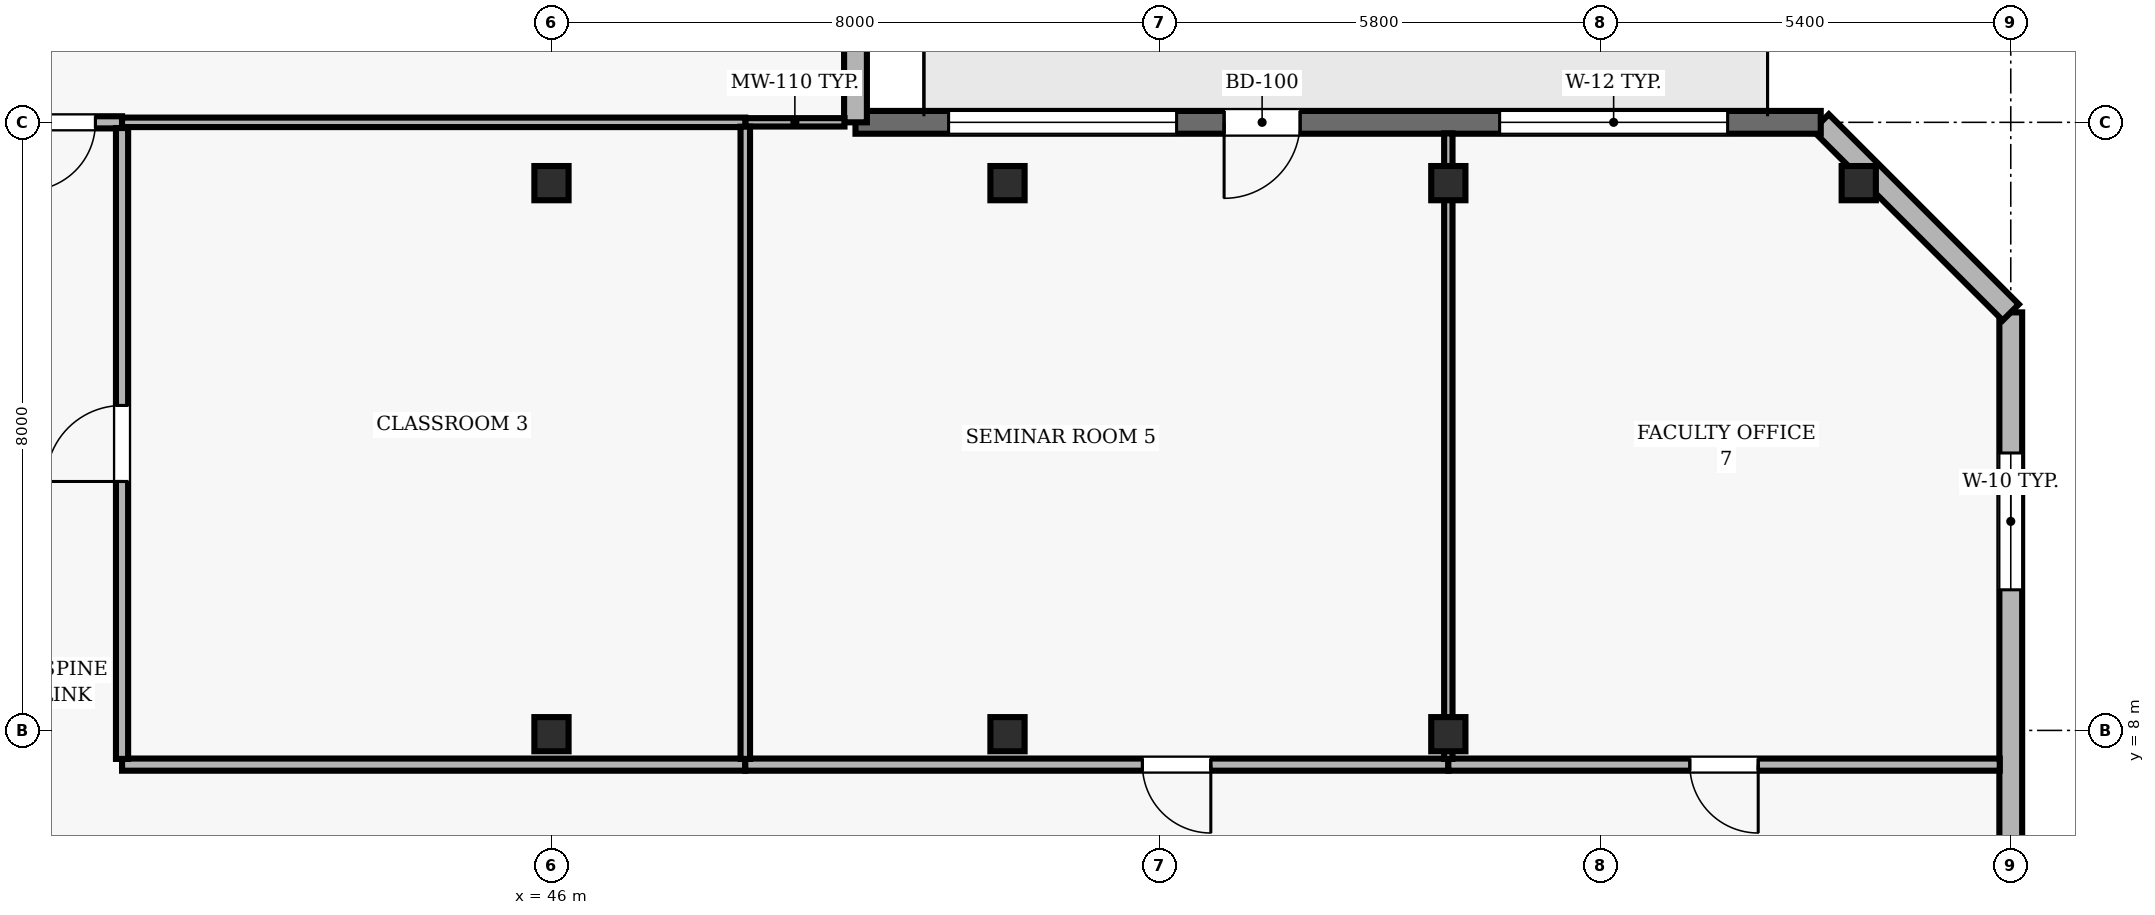
"""IFC4 building model, lengths in metres.
Left out: names, types, materials, properties, quantities, classifications, styles, units other than length and angle.
Written with IfcOpenShell. Run it as: python <this file> out.ifc"""

import sys

from ifc_helpers import new_model, si_unit, direction, frame, frame_2d, origin, origin_2d, place, context, subcontext, project, spatial, rectangle, hollow_rectangle, extrude, element, fill, save


model = new_model("IFC4")
c1 = context("Model", 3, precision=1e-05, world=origin(), true_north=direction((0.0, 1.0)))
c2 = subcontext(c1, "Body", "Model", "MODEL_VIEW")
j1 = project(units=[si_unit("LENGTHUNIT", "METRE"), si_unit("PLANEANGLEUNIT", "RADIAN")], contexts=[c1])
p1 = place(None, origin())
s1 = spatial("IfcSite", under=j1, at=p1, CompositionType="ELEMENT")
p2 = place(p1, origin())
s2 = spatial("IfcBuilding", under=s1, at=p2, CompositionType="ELEMENT")
p3 = place(p2, frame((0.0, 0.0, 179.7)))
s3 = spatial("IfcBuildingStorey", under=s2, at=p3, CompositionType="ELEMENT", Elevation=179.7)
for number, where, z_axis, x_axis in (
    (1, (46.0, 7.95, 0.0), (0.0, 0.0, 1.0), (1.0, 0.0, 0.0)),
    (2, (46.0, 15.2, 0.0), (0.0, 0.0, 1.0), (1.0, 0.0, 0.0)),
    (3, (52.0, 7.95, 0.0), (0.0, 0.0, 1.0), (1.0, 0.0, 0.0)),
    (4, (52.0, 15.2, 0.0), (0.0, 0.0, 1.0), (1.0, 0.0, 0.0)),
    (5, (57.8, 7.95, 0.0), (0.0, 0.0, 1.0), (1.0, 0.0, 0.0)),
    (6, (57.8, 15.2, 0.0), (0.0, 0.0, 1.0), (1.0, 0.0, 0.0)),
    (7, (63.2, 15.2, 0.0), (0.0, 0.0, 1.0), (1.0, 0.0, 0.0)),
):
    element("IfcColumn", number, at=place(p3, frame(where, z_axis=z_axis, x_axis=x_axis)), inside=s3, PredefinedType="COLUMN", context=c2, shape_type="SweptSolid", body=[
        extrude(hollow_rectangle(XDim=0.45, YDim=0.45, WallThickness=0.02, at=origin_2d()), origin(), (0.0, 0.0, 1.0), 3.9),
    ])
p4 = place(p3, frame((65.2, 2.5, 0.0), z_axis=(0.0, 0.0, 1.0), x_axis=(0.0, 1.0, 0.0)))
e8 = element("IfcWall", 8, at=p4, inside=s3, PredefinedType="SOLIDWALL", context=c2, shape_type="SweptSolid", body=[
    extrude(rectangle(XDim=11.0, YDim=0.3, at=frame_2d((5.5, 0.0))), origin(), (0.0, 0.0, 1.0), 3.69),
])
p5 = place(p4, frame((7.35, 0.0, 0.9)))
e9 = element("IfcOpeningElement", 9, at=p5, cuts=e8, PredefinedType="OPENING", context=c2, shape_type="SweptSolid", body=[
    extrude(rectangle(XDim=1.8, YDim=2.2, at=frame_2d((0.9, 1.1))), frame((0.0, 0.16, 0.0), z_axis=(0.0, -1.0, 0.0), x_axis=(1.0, 0.0, 0.0)), (0.0, 0.0, 1.0), 0.32),
])
p6 = place(p3, frame((65.2, 13.5, 0.0), z_axis=(0.0, 0.0, 1.0), x_axis=(-0.707106781187, 0.707106781187, 0.0)))
e10 = element("IfcWall", 10, at=p6, inside=s3, PredefinedType="SOLIDWALL", context=c2, shape_type="SweptSolid", body=[
    extrude(rectangle(XDim=3.536, YDim=0.3, at=frame_2d((1.768, 0.0))), origin(), (0.0, 0.0, 1.0), 3.69),
])
p7 = place(p3, frame((62.7, 16.0, 0.0), z_axis=(0.0, 0.0, 1.0), x_axis=(-1.0, 0.0, 0.0)))
e11 = element("IfcWall", 11, at=p7, inside=s3, PredefinedType="SOLIDWALL", context=c2, shape_type="SweptSolid", body=[
    extrude(rectangle(XDim=12.7, YDim=0.3, at=frame_2d((6.35, 0.0))), origin(), (0.0, 0.0, 1.0), 3.69),
])
p8 = place(p7, frame((6.85, 0.0, 0.0)))
e12 = element("IfcOpeningElement", 12, at=p8, cuts=e11, PredefinedType="OPENING", context=c2, shape_type="SweptSolid", body=[
    extrude(rectangle(XDim=1.0, YDim=2.2, at=frame_2d((0.5, 1.1))), frame((0.0, 0.16, 0.0), z_axis=(0.0, -1.0, 0.0), x_axis=(1.0, 0.0, 0.0)), (0.0, 0.0, 1.0), 0.32),
])
p9 = place(p7, frame((1.225, 0.0, 0.9)))
e13 = element("IfcOpeningElement", 13, at=p9, cuts=e11, PredefinedType="OPENING", context=c2, shape_type="SweptSolid", body=[
    extrude(rectangle(XDim=3.0, YDim=2.2, at=frame_2d((1.5, 1.1))), frame((0.0, 0.16, 0.0), z_axis=(0.0, -1.0, 0.0), x_axis=(1.0, 0.0, 0.0)), (0.0, 0.0, 1.0), 0.32),
])
p10 = place(p7, frame((8.475, 0.0, 0.9)))
e14 = element("IfcOpeningElement", 14, at=p10, cuts=e11, PredefinedType="OPENING", context=c2, shape_type="SweptSolid", body=[
    extrude(rectangle(XDim=3.0, YDim=2.2, at=frame_2d((1.5, 1.1))), frame((0.0, 0.16, 0.0), z_axis=(0.0, -1.0, 0.0), x_axis=(1.0, 0.0, 0.0)), (0.0, 0.0, 1.0), 0.32),
])
p11 = place(p3, frame((50.0, 16.0, 0.0), z_axis=(0.0, 0.0, 1.0), x_axis=(0.0, 1.0, 0.0)))
e15 = element("IfcWall", 15, at=p11, inside=s3, PredefinedType="SOLIDWALL", context=c2, shape_type="SweptSolid", body=[
    extrude(rectangle(XDim=7.44, YDim=0.3, at=frame_2d((3.72, 0.0))), origin(), (0.0, 0.0, 1.0), 3.69),
])
p12 = place(p11, frame((3.12, 0.0, 0.9)))
e16 = element("IfcOpeningElement", 16, at=p12, cuts=e15, PredefinedType="OPENING", context=c2, shape_type="SweptSolid", body=[
    extrude(rectangle(XDim=1.2, YDim=1.6, at=frame_2d((0.6, 0.8))), frame((0.0, 0.16, 0.0), z_axis=(0.0, -1.0, 0.0), x_axis=(1.0, 0.0, 0.0)), (0.0, 0.0, 1.0), 0.32),
])
p13 = place(p3, frame((40.35, 16.0, 0.0), z_axis=(0.0, 0.0, 1.0), x_axis=(-1.0, 0.0, 0.0)))
e17 = element("IfcWall", 17, at=p13, inside=s3, PredefinedType="PARTITIONING", context=c2, shape_type="SweptSolid", body=[
    extrude(rectangle(XDim=2.3, YDim=0.16, at=frame_2d((1.15, 0.0))), origin(), (0.0, 0.0, 1.0), 3.69),
])
p14 = place(p13, frame((0.35, 0.0, 0.0)))
e18 = element("IfcOpeningElement", 18, at=p14, cuts=e17, PredefinedType="OPENING", context=c2, shape_type="SweptSolid", body=[
    extrude(rectangle(XDim=0.9, YDim=2.1, at=frame_2d((0.45, 1.05))), frame((0.0, 0.09, 0.0), z_axis=(0.0, -1.0, 0.0), x_axis=(1.0, 0.0, 0.0)), (0.0, 0.0, 1.0), 0.18),
])
p15 = place(p3, frame((48.55, 7.55, 0.0), z_axis=(0.0, 0.0, 1.0), x_axis=(-1.0, 0.0, 0.0)))
e19 = element("IfcWall", 19, at=p15, inside=s3, PredefinedType="PARTITIONING", context=c2, shape_type="SweptSolid", body=[
    extrude(rectangle(XDim=8.2, YDim=0.16, at=frame_2d((4.1, 0.0))), origin(), (0.0, 0.0, 1.0), 3.146),
])
p16 = place(p3, frame((48.55, 16.0, 0.0), z_axis=(0.0, 0.0, 1.0), x_axis=(1.0, 0.0, 0.0)))
e20 = element("IfcWall", 20, at=p16, inside=s3, PredefinedType="MOVABLE", context=c2, shape_type="SweptSolid", body=[
    extrude(rectangle(XDim=1.305, YDim=0.11, at=frame_2d((0.652, 0.0))), origin(), (0.0, 0.0, 1.0), 3.69),
])
p17 = place(p3, frame((48.55, 16.0, 0.0), z_axis=(0.0, 0.0, 1.0), x_axis=(-1.0, 0.0, 0.0)))
e21 = element("IfcWall", 21, at=p17, inside=s3, PredefinedType="PARTITIONING", context=c2, shape_type="SweptSolid", body=[
    extrude(rectangle(XDim=8.2, YDim=0.125, at=frame_2d((4.1, 0.0))), origin(), (0.0, 0.0, 1.0), 3.69),
])
p18 = place(p3, frame((57.8, 7.55, 0.0), z_axis=(0.0, 0.0, 1.0), x_axis=(-1.0, 0.0, 0.0)))
e22 = element("IfcWall", 22, at=p18, inside=s3, PredefinedType="PARTITIONING", context=c2, shape_type="SweptSolid", body=[
    extrude(rectangle(XDim=9.25, YDim=0.16, at=frame_2d((4.625, 0.0))), origin(), (0.0, 0.0, 1.0), 3.146),
])
p19 = place(p18, frame((3.125, 0.0, 0.0)))
e23 = element("IfcOpeningElement", 23, at=p19, cuts=e22, PredefinedType="OPENING", context=c2, shape_type="SweptSolid", body=[
    extrude(rectangle(XDim=0.9, YDim=2.1, at=frame_2d((0.45, 1.05))), frame((0.0, 0.09, 0.0), z_axis=(0.0, -1.0, 0.0), x_axis=(1.0, 0.0, 0.0)), (0.0, 0.0, 1.0), 0.18),
])
p20 = place(p3, frame((65.055, 7.55, 0.0), z_axis=(0.0, 0.0, 1.0), x_axis=(-1.0, 0.0, 0.0)))
e24 = element("IfcWall", 24, at=p20, inside=s3, PredefinedType="PARTITIONING", context=c2, shape_type="SweptSolid", body=[
    extrude(rectangle(XDim=7.255, YDim=0.16, at=frame_2d((3.627, 0.0))), origin(), (0.0, 0.0, 1.0), 3.69),
])
p21 = place(p20, frame((3.178, 0.0, 0.0)))
e25 = element("IfcOpeningElement", 25, at=p21, cuts=e24, PredefinedType="OPENING", context=c2, shape_type="SweptSolid", body=[
    extrude(rectangle(XDim=0.9, YDim=2.1, at=frame_2d((0.45, 1.05))), frame((0.0, 0.09, 0.0), z_axis=(0.0, -1.0, 0.0), x_axis=(1.0, 0.0, 0.0)), (0.0, 0.0, 1.0), 0.18),
])
p22 = place(p3, frame((40.35, 7.625, 0.0), z_axis=(0.0, 0.0, 1.0), x_axis=(0.0, 1.0, 0.0)))
e26 = element("IfcWall", 26, at=p22, inside=s3, PredefinedType="PARTITIONING", context=c2, shape_type="SweptSolid", body=[
    extrude(rectangle(XDim=8.3, YDim=0.16, at=frame_2d((4.15, 0.0))), origin(), (0.0, 0.0, 1.0), 3.372),
])
p23 = place(p22, frame((3.65, 0.0, 0.0)))
e27 = element("IfcOpeningElement", 27, at=p23, cuts=e26, PredefinedType="OPENING", context=c2, shape_type="SweptSolid", body=[
    extrude(rectangle(XDim=1.0, YDim=2.1, at=frame_2d((0.5, 1.05))), frame((0.0, 0.09, 0.0), z_axis=(0.0, -1.0, 0.0), x_axis=(1.0, 0.0, 0.0)), (0.0, 0.0, 1.0), 0.18),
])
p24 = place(p3, frame((48.55, 7.625, 0.0), z_axis=(0.0, 0.0, 1.0), x_axis=(0.0, 1.0, 0.0)))
e28 = element("IfcWall", 28, at=p24, inside=s3, PredefinedType="PARTITIONING", context=c2, shape_type="SweptSolid", body=[
    extrude(rectangle(XDim=8.318, YDim=0.125, at=frame_2d((4.159, 0.0))), origin(), (0.0, 0.0, 1.0), 3.69),
])
p25 = place(p3, frame((57.8, 7.625, 0.0), z_axis=(0.0, 0.0, 1.0), x_axis=(0.0, 1.0, 0.0)))
e29 = element("IfcWall", 29, at=p25, inside=s3, PredefinedType="MOVABLE", context=c2, shape_type="SweptSolid", body=[
    extrude(rectangle(XDim=8.23, YDim=0.11, at=frame_2d((4.115, 0.0))), origin(), (0.0, 0.0, 1.0), 3.146),
])
p26 = place(p5, origin())
e30 = element("IfcWindow", 30, at=p26, inside=s3, PartitioningType="SINGLE_PANEL", PredefinedType="WINDOW", context=c2, shape_type="SweptSolid", body=[
    extrude(rectangle(XDim=1.8, YDim=2.2, at=frame_2d((0.9, 1.1))), frame((0.0, 0.03, 0.0), z_axis=(0.0, -1.0, 0.0), x_axis=(1.0, 0.0, 0.0)), (0.0, 0.0, 1.0), 0.06),
])
fill(e9, e30)
p27 = place(p8, origin())
e31 = element("IfcDoor", 31, at=p27, inside=s3, OperationType="SINGLE_SWING_RIGHT", PredefinedType="DOOR", context=c2, shape_type="SweptSolid", body=[
    extrude(rectangle(XDim=1.0, YDim=2.2, at=frame_2d((0.5, 1.1))), frame((0.0, 0.025, 0.0), z_axis=(0.0, -1.0, 0.0), x_axis=(1.0, 0.0, 0.0)), (0.0, 0.0, 1.0), 0.05),
])
fill(e12, e31)
p28 = place(p9, origin())
e32 = element("IfcWindow", 32, at=p28, inside=s3, PartitioningType="SINGLE_PANEL", PredefinedType="WINDOW", context=c2, shape_type="SweptSolid", body=[
    extrude(rectangle(XDim=3.0, YDim=2.2, at=frame_2d((1.5, 1.1))), frame((0.0, 0.03, 0.0), z_axis=(0.0, -1.0, 0.0), x_axis=(1.0, 0.0, 0.0)), (0.0, 0.0, 1.0), 0.06),
])
fill(e13, e32)
p29 = place(p10, origin())
e33 = element("IfcWindow", 33, at=p29, inside=s3, PartitioningType="SINGLE_PANEL", PredefinedType="WINDOW", context=c2, shape_type="SweptSolid", body=[
    extrude(rectangle(XDim=3.0, YDim=2.2, at=frame_2d((1.5, 1.1))), frame((0.0, 0.03, 0.0), z_axis=(0.0, -1.0, 0.0), x_axis=(1.0, 0.0, 0.0)), (0.0, 0.0, 1.0), 0.06),
])
fill(e14, e33)
p30 = place(p23, origin())
e34 = element("IfcDoor", 34, at=p30, inside=s3, OperationType="SINGLE_SWING_LEFT", PredefinedType="DOOR", context=c2, shape_type="SweptSolid", body=[
    extrude(rectangle(XDim=1.0, YDim=2.1, at=frame_2d((0.5, 1.05))), frame((0.0, 0.025, 0.0), z_axis=(0.0, -1.0, 0.0), x_axis=(1.0, 0.0, 0.0)), (0.0, 0.0, 1.0), 0.05),
])
fill(e27, e34)
p31 = place(p19, origin())
e35 = element("IfcDoor", 35, at=p31, inside=s3, OperationType="SINGLE_SWING_LEFT", PredefinedType="DOOR", context=c2, shape_type="SweptSolid", body=[
    extrude(rectangle(XDim=0.9, YDim=2.1, at=frame_2d((0.45, 1.05))), frame((0.0, 0.025, 0.0), z_axis=(0.0, -1.0, 0.0), x_axis=(1.0, 0.0, 0.0)), (0.0, 0.0, 1.0), 0.05),
])
fill(e23, e35)
p32 = place(p21, origin())
e36 = element("IfcDoor", 36, at=p32, inside=s3, OperationType="SINGLE_SWING_LEFT", PredefinedType="DOOR", context=c2, shape_type="SweptSolid", body=[
    extrude(rectangle(XDim=0.9, YDim=2.1, at=frame_2d((0.45, 1.05))), frame((0.0, 0.025, 0.0), z_axis=(0.0, -1.0, 0.0), x_axis=(1.0, 0.0, 0.0)), (0.0, 0.0, 1.0), 0.05),
])
fill(e25, e36)
p33 = place(p14, origin())
e37 = element("IfcDoor", 37, at=p33, inside=s3, OperationType="SINGLE_SWING_RIGHT", PredefinedType="DOOR", context=c2, shape_type="SweptSolid", body=[
    extrude(rectangle(XDim=0.9, YDim=2.1, at=frame_2d((0.45, 1.05))), frame((0.0, 0.025, 0.0), z_axis=(0.0, -1.0, 0.0), x_axis=(1.0, 0.0, 0.0)), (0.0, 0.0, 1.0), 0.05),
])
fill(e18, e37)
save(model, sys.argv[1])
